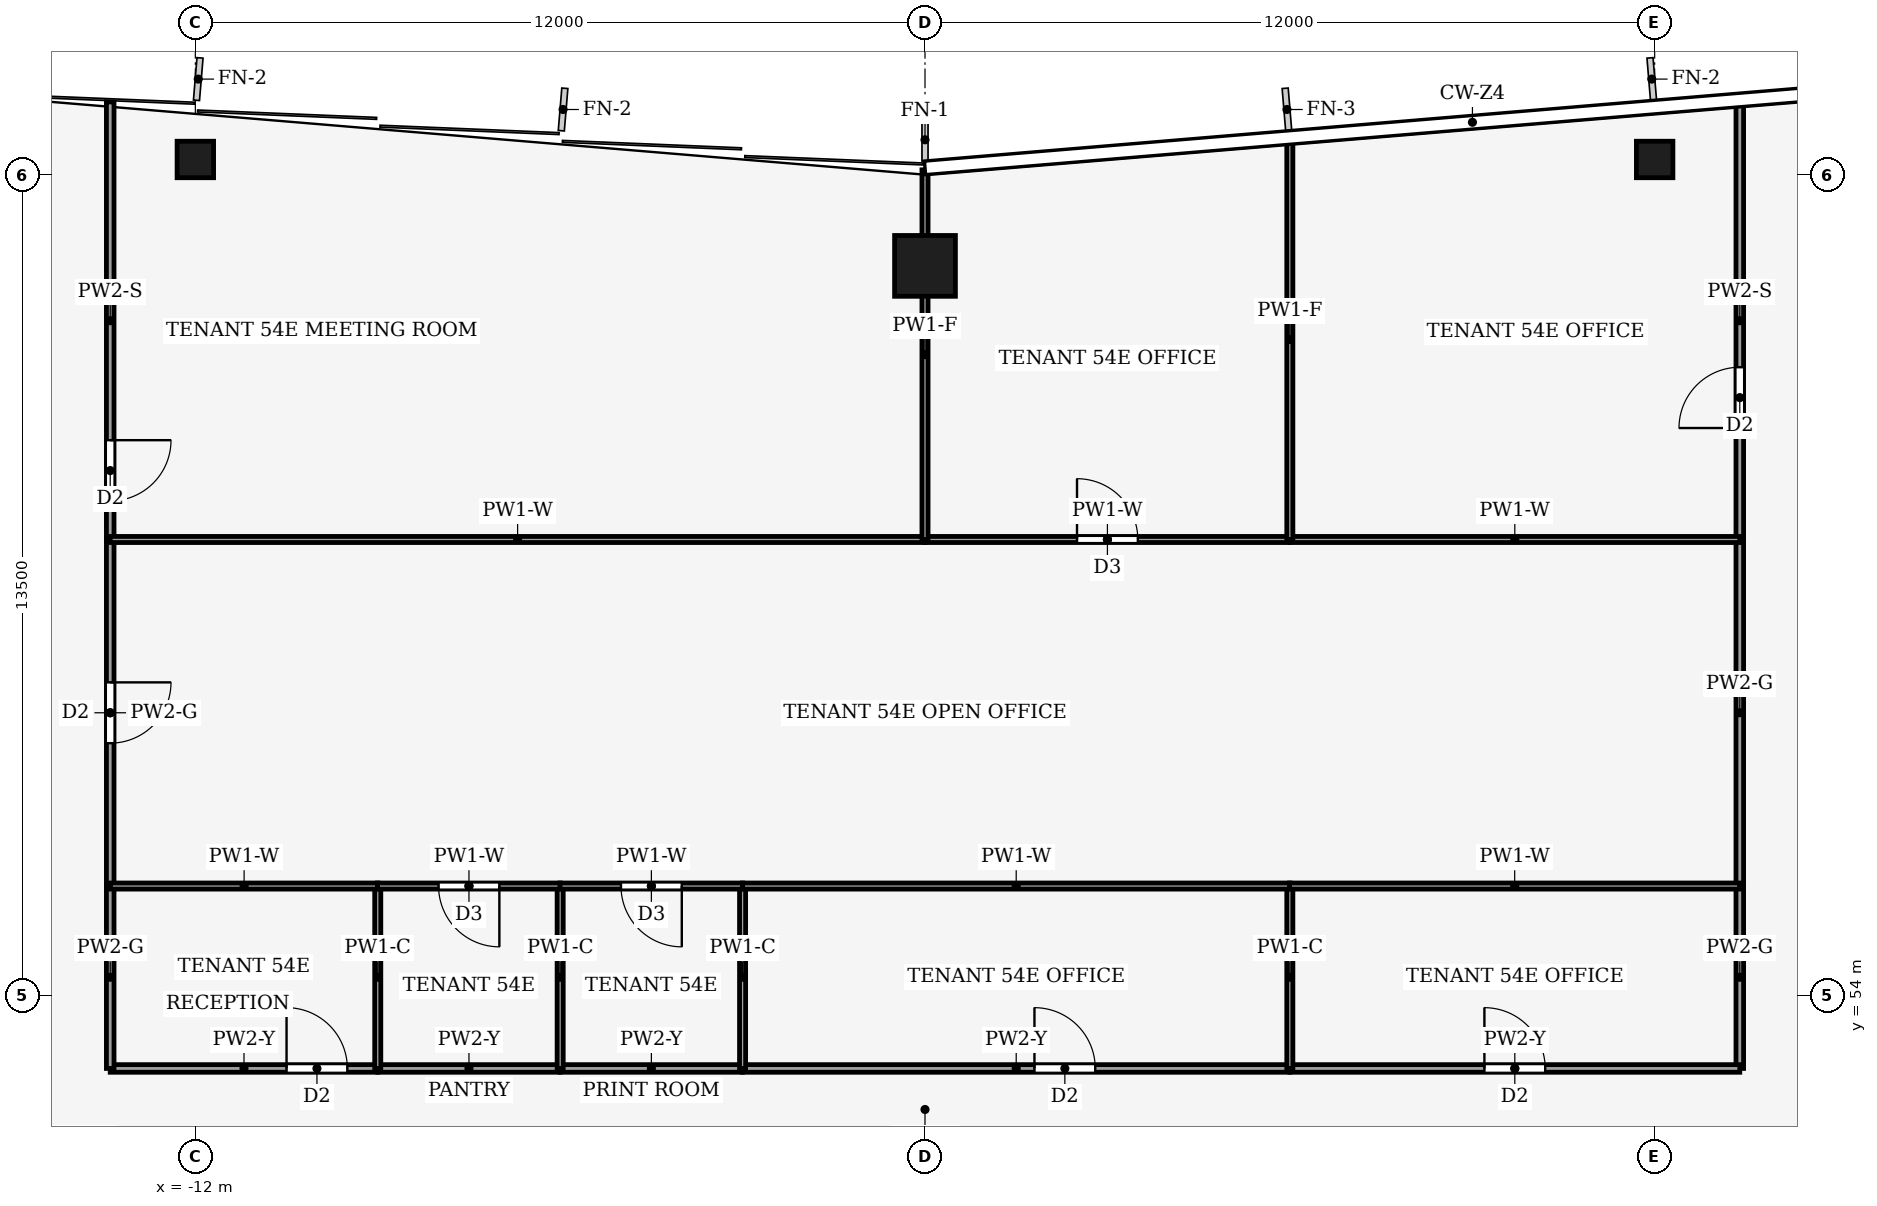
"""IFC4 building model, lengths in metres.
Left out: names, types, materials, properties, quantities, classifications, styles, units other than length and angle.
Written with IfcOpenShell. Run it as: python <this file> out.ifc"""

import sys

from ifc_helpers import new_model, si_unit, direction, frame, frame_2d, origin, origin_2d, place, context, subcontext, project, spatial, rectangle, hollow_rectangle, extrude, element, fill, save


model = new_model("IFC4")
c1 = context("Model", 3, precision=1e-05, world=origin(), true_north=direction((0.0, 1.0)))
c2 = subcontext(c1, "Body", "Model", "MODEL_VIEW")
j1 = project(units=[si_unit("LENGTHUNIT", "METRE"), si_unit("PLANEANGLEUNIT", "RADIAN")], contexts=[c1])
p1 = place(None, origin())
s1 = spatial("IfcSite", under=j1, at=p1, CompositionType="ELEMENT")
p2 = place(p1, origin())
s2 = spatial("IfcBuilding", under=s1, at=p2, CompositionType="ELEMENT")
p3 = place(p2, frame((0.0, 0.0, 238.0)))
s3 = spatial("IfcBuildingStorey", under=s2, at=p3, CompositionType="ELEMENT", Elevation=238.0)
p4 = place(p3, frame((0.0, 66.0, 0.0), z_axis=(0.0, 0.0, 1.0), x_axis=(1.0, 0.0, 0.0)))
e1 = element("IfcColumn", 1, at=p4, inside=s3, PredefinedType="COLUMN", context=c2, shape_type="SweptSolid", body=[
    extrude(hollow_rectangle(XDim=1.0, YDim=1.0, WallThickness=0.045, at=origin_2d()), origin(), (0.0, 0.0, 1.0), 4.0),
])
for number, where, z_axis, x_axis in (
    (2, (-12.0, 67.75, 0.0), (0.0, 0.0, 1.0), (1.0, 0.0, 0.0)),
    (3, (12.0, 67.75, 0.0), (0.0, 0.0, 1.0), (1.0, 0.0, 0.0)),
):
    element("IfcColumn", number, at=place(p3, frame(where, z_axis=z_axis, x_axis=x_axis)), inside=s3, PredefinedType="COLUMN", context=c2, shape_type="SweptSolid", body=[
        extrude(hollow_rectangle(XDim=0.6, YDim=0.6, WallThickness=0.025, at=origin_2d()), origin(), (0.0, 0.0, 1.0), 4.0),
    ])
p5 = place(p3, frame((-13.4, 52.8, 0.0), z_axis=(0.0, 0.0, 1.0), x_axis=(1.0, 0.0, 0.0)))
e4 = element("IfcWall", 4, at=p5, inside=s3, PredefinedType="PARTITIONING", context=c2, shape_type="SweptSolid", body=[
    extrude(rectangle(XDim=4.4, YDim=0.125, at=frame_2d((2.2, 0.0))), origin(), (0.0, 0.0, 1.0), 3.24),
])
p6 = place(p5, frame((2.9, 0.0, 0.0)))
e5 = element("IfcOpeningElement", 5, at=p6, cuts=e4, PredefinedType="OPENING", context=c2, shape_type="SweptSolid", body=[
    extrude(rectangle(XDim=1.0, YDim=2.1, at=frame_2d((0.5, 1.05))), frame((0.0, 0.073, 0.0), z_axis=(0.0, -1.0, 0.0), x_axis=(1.0, 0.0, 0.0)), (0.0, 0.0, 1.0), 0.145),
])
p7 = place(p3, frame((-13.4, 52.8, 0.0), z_axis=(0.0, 0.0, 1.0), x_axis=(0.0, 1.0, 0.0)))
e6 = element("IfcWall", 6, at=p7, inside=s3, PredefinedType="PARTITIONING", context=c2, shape_type="SweptSolid", body=[
    extrude(rectangle(XDim=3.0, YDim=0.125, at=frame_2d((1.5, 0.0))), origin(), (0.0, 0.0, 1.0), 3.87),
])
for number, where, z_axis, x_axis in (
    (7, (-6.0, 52.8, 0.0), (0.0, 0.0, 1.0), (-1.0, 0.0, 0.0)),
    (8, (-3.0, 52.8, 0.0), (0.0, 0.0, 1.0), (-1.0, 0.0, 0.0)),
):
    element("IfcWall", number, at=place(p3, frame(where, z_axis=z_axis, x_axis=x_axis)), inside=s3, PredefinedType="PARTITIONING", context=c2, shape_type="SweptSolid", body=[
        extrude(rectangle(XDim=3.0, YDim=0.125, at=frame_2d((1.5, 0.0))), origin(), (0.0, 0.0, 1.0), 3.24),
    ])
p8 = place(p3, frame((-3.0, 52.8, 0.0), z_axis=(0.0, 0.0, 1.0), x_axis=(1.0, 0.0, 0.0)))
e9 = element("IfcWall", 9, at=p8, inside=s3, PredefinedType="PARTITIONING", context=c2, shape_type="SweptSolid", body=[
    extrude(rectangle(XDim=9.0, YDim=0.125, at=frame_2d((4.5, 0.0))), origin(), (0.0, 0.0, 1.0), 3.24),
])
p9 = place(p8, frame((4.8, 0.0, 0.0)))
e10 = element("IfcOpeningElement", 10, at=p9, cuts=e9, PredefinedType="OPENING", context=c2, shape_type="SweptSolid", body=[
    extrude(rectangle(XDim=1.0, YDim=2.1, at=frame_2d((0.5, 1.05))), frame((0.0, 0.073, 0.0), z_axis=(0.0, -1.0, 0.0), x_axis=(1.0, 0.0, 0.0)), (0.0, 0.0, 1.0), 0.145),
])
p10 = place(p3, frame((13.4, 52.8, 0.0), z_axis=(0.0, 0.0, 1.0), x_axis=(0.0, 1.0, 0.0)))
e11 = element("IfcWall", 11, at=p10, inside=s3, PredefinedType="PARTITIONING", context=c2, shape_type="SweptSolid", body=[
    extrude(rectangle(XDim=3.0, YDim=0.125, at=frame_2d((1.5, 0.0))), origin(), (0.0, 0.0, 1.0), 3.87),
])
p11 = place(p3, frame((6.0, 52.8, 0.0), z_axis=(0.0, 0.0, 1.0), x_axis=(1.0, 0.0, 0.0)))
e12 = element("IfcWall", 12, at=p11, inside=s3, PredefinedType="PARTITIONING", context=c2, shape_type="SweptSolid", body=[
    extrude(rectangle(XDim=7.4, YDim=0.125, at=frame_2d((3.7, 0.0))), origin(), (0.0, 0.0, 1.0), 3.24),
])
p12 = place(p11, frame((3.2, 0.0, 0.0)))
e13 = element("IfcOpeningElement", 13, at=p12, cuts=e12, PredefinedType="OPENING", context=c2, shape_type="SweptSolid", body=[
    extrude(rectangle(XDim=1.0, YDim=2.1, at=frame_2d((0.5, 1.05))), frame((0.0, 0.073, 0.0), z_axis=(0.0, -1.0, 0.0), x_axis=(1.0, 0.0, 0.0)), (0.0, 0.0, 1.0), 0.145),
])
p13 = place(p3, frame((-13.4, 61.5, 0.0), z_axis=(0.0, 0.0, 1.0), x_axis=(0.0, -1.0, 0.0)))
e14 = element("IfcWall", 14, at=p13, inside=s3, PredefinedType="PARTITIONING", context=c2, shape_type="SweptSolid", body=[
    extrude(rectangle(XDim=5.7, YDim=0.125, at=frame_2d((2.85, 0.0))), origin(), (0.0, 0.0, 1.0), 3.87),
])
p14 = place(p13, frame((2.35, 0.0, 0.0)))
e15 = element("IfcOpeningElement", 15, at=p14, cuts=e14, PredefinedType="OPENING", context=c2, shape_type="SweptSolid", body=[
    extrude(rectangle(XDim=1.0, YDim=2.1, at=frame_2d((0.5, 1.05))), frame((0.0, 0.073, 0.0), z_axis=(0.0, -1.0, 0.0), x_axis=(1.0, 0.0, 0.0)), (0.0, 0.0, 1.0), 0.145),
])
p15 = place(p3, frame((13.4, 55.8, 0.0), z_axis=(0.0, 0.0, 1.0), x_axis=(0.0, 1.0, 0.0)))
e16 = element("IfcWall", 16, at=p15, inside=s3, PredefinedType="PARTITIONING", context=c2, shape_type="SweptSolid", body=[
    extrude(rectangle(XDim=5.7, YDim=0.125, at=frame_2d((2.85, 0.0))), origin(), (0.0, 0.0, 1.0), 3.87),
])
p16 = place(p3, frame((-13.4, 68.697, 0.0), z_axis=(0.0, 0.0, 1.0), x_axis=(0.0, -1.0, 0.0)))
e17 = element("IfcWall", 17, at=p16, inside=s3, PredefinedType="PARTITIONING", context=c2, shape_type="SweptSolid", body=[
    extrude(rectangle(XDim=7.197, YDim=0.125, at=frame_2d((3.598, 0.0))), origin(), (0.0, 0.0, 1.0), 3.04),
])
p17 = place(p16, frame((5.563, 0.0, 0.0)))
e18 = element("IfcOpeningElement", 18, at=p17, cuts=e17, PredefinedType="OPENING", context=c2, shape_type="SweptSolid", body=[
    extrude(rectangle(XDim=1.0, YDim=2.1, at=frame_2d((0.5, 1.05))), frame((0.0, 0.073, 0.0), z_axis=(0.0, -1.0, 0.0), x_axis=(1.0, 0.0, 0.0)), (0.0, 0.0, 1.0), 0.145),
])
p18 = place(p3, frame((13.4, 61.5, 0.0), z_axis=(0.0, 0.0, 1.0), x_axis=(0.0, 1.0, 0.0)))
e19 = element("IfcWall", 19, at=p18, inside=s3, PredefinedType="PARTITIONING", context=c2, shape_type="SweptSolid", body=[
    extrude(rectangle(XDim=7.197, YDim=0.125, at=frame_2d((3.598, 0.0))), origin(), (0.0, 0.0, 1.0), 3.04),
])
p19 = place(p18, frame((1.833, 0.0, 0.0)))
e20 = element("IfcOpeningElement", 20, at=p19, cuts=e19, PredefinedType="OPENING", context=c2, shape_type="SweptSolid", body=[
    extrude(rectangle(XDim=1.0, YDim=2.1, at=frame_2d((0.5, 1.05))), frame((0.0, 0.073, 0.0), z_axis=(0.0, -1.0, 0.0), x_axis=(1.0, 0.0, 0.0)), (0.0, 0.0, 1.0), 0.145),
])
p20 = place(p3, frame((-9.0, 52.8, 0.0), z_axis=(0.0, 0.0, 1.0), x_axis=(0.0, 1.0, 0.0)))
e21 = element("IfcWall", 21, at=p20, inside=s3, PredefinedType="PARTITIONING", context=c2, shape_type="SweptSolid", body=[
    extrude(rectangle(XDim=3.0, YDim=0.1, at=frame_2d((1.5, 0.0))), origin(), (0.0, 0.0, 1.0), 3.87),
])
p21 = place(p3, frame((-8.996, 55.8, 0.0), z_axis=(0.0, 0.0, 1.0), x_axis=(-1.0, 0.0, 0.0)))
e22 = element("IfcWall", 22, at=p21, inside=s3, PredefinedType="PARTITIONING", context=c2, shape_type="SweptSolid", body=[
    extrude(rectangle(XDim=4.404, YDim=0.1, at=frame_2d((2.202, 0.0))), origin(), (0.0, 0.0, 1.0), 3.24),
])
p22 = place(p3, frame((-6.0, 52.8, 0.0), z_axis=(0.0, 0.0, 1.0), x_axis=(0.0, 1.0, 0.0)))
e23 = element("IfcWall", 23, at=p22, inside=s3, PredefinedType="PARTITIONING", context=c2, shape_type="SweptSolid", body=[
    extrude(rectangle(XDim=3.0, YDim=0.1, at=frame_2d((1.5, 0.0))), origin(), (0.0, 0.0, 1.0), 3.87),
])
p23 = place(p3, frame((-5.996, 55.8, 0.0), z_axis=(0.0, 0.0, 1.0), x_axis=(-1.0, 0.0, 0.0)))
e24 = element("IfcWall", 24, at=p23, inside=s3, PredefinedType="PARTITIONING", context=c2, shape_type="SweptSolid", body=[
    extrude(rectangle(XDim=3.008, YDim=0.1, at=frame_2d((1.504, 0.0))), origin(), (0.0, 0.0, 1.0), 3.24),
])
p24 = place(p23, frame((1.004, 0.0, 0.0)))
e25 = element("IfcOpeningElement", 25, at=p24, cuts=e24, PredefinedType="OPENING", context=c2, shape_type="SweptSolid", body=[
    extrude(rectangle(XDim=1.0, YDim=2.1, at=frame_2d((0.5, 1.05))), frame((0.0, 0.06, 0.0), z_axis=(0.0, -1.0, 0.0), x_axis=(1.0, 0.0, 0.0)), (0.0, 0.0, 1.0), 0.12),
])
p25 = place(p3, frame((-3.0, 52.8, 0.0), z_axis=(0.0, 0.0, 1.0), x_axis=(0.0, 1.0, 0.0)))
e26 = element("IfcWall", 26, at=p25, inside=s3, PredefinedType="PARTITIONING", context=c2, shape_type="SweptSolid", body=[
    extrude(rectangle(XDim=3.0, YDim=0.1, at=frame_2d((1.5, 0.0))), origin(), (0.0, 0.0, 1.0), 3.87),
])
p26 = place(p3, frame((-2.996, 55.8, 0.0), z_axis=(0.0, 0.0, 1.0), x_axis=(-1.0, 0.0, 0.0)))
e27 = element("IfcWall", 27, at=p26, inside=s3, PredefinedType="PARTITIONING", context=c2, shape_type="SweptSolid", body=[
    extrude(rectangle(XDim=3.008, YDim=0.1, at=frame_2d((1.504, 0.0))), origin(), (0.0, 0.0, 1.0), 3.24),
])
p27 = place(p26, frame((1.004, 0.0, 0.0)))
e28 = element("IfcOpeningElement", 28, at=p27, cuts=e27, PredefinedType="OPENING", context=c2, shape_type="SweptSolid", body=[
    extrude(rectangle(XDim=1.0, YDim=2.1, at=frame_2d((0.5, 1.05))), frame((0.0, 0.06, 0.0), z_axis=(0.0, -1.0, 0.0), x_axis=(1.0, 0.0, 0.0)), (0.0, 0.0, 1.0), 0.12),
])
p28 = place(p3, frame((6.0, 52.8, 0.0), z_axis=(0.0, 0.0, 1.0), x_axis=(0.0, 1.0, 0.0)))
e29 = element("IfcWall", 29, at=p28, inside=s3, PredefinedType="PARTITIONING", context=c2, shape_type="SweptSolid", body=[
    extrude(rectangle(XDim=3.0, YDim=0.1, at=frame_2d((1.5, 0.0))), origin(), (0.0, 0.0, 1.0), 3.87),
])
p29 = place(p3, frame((6.004, 55.8, 0.0), z_axis=(0.0, 0.0, 1.0), x_axis=(-1.0, 0.0, 0.0)))
e30 = element("IfcWall", 30, at=p29, inside=s3, PredefinedType="PARTITIONING", context=c2, shape_type="SweptSolid", body=[
    extrude(rectangle(XDim=9.008, YDim=0.1, at=frame_2d((4.504, 0.0))), origin(), (0.0, 0.0, 1.0), 3.24),
])
p30 = place(p3, frame((13.4, 55.8, 0.0), z_axis=(0.0, 0.0, 1.0), x_axis=(-1.0, 0.0, 0.0)))
e31 = element("IfcWall", 31, at=p30, inside=s3, PredefinedType="PARTITIONING", context=c2, shape_type="SweptSolid", body=[
    extrude(rectangle(XDim=7.404, YDim=0.1, at=frame_2d((3.702, 0.0))), origin(), (0.0, 0.0, 1.0), 3.24),
])
p31 = place(p3, frame((0.0, 61.5, 0.0), z_axis=(0.0, 0.0, 1.0), x_axis=(-1.0, 0.0, 0.0)))
e32 = element("IfcWall", 32, at=p31, inside=s3, PredefinedType="PARTITIONING", context=c2, shape_type="SweptSolid", body=[
    extrude(rectangle(XDim=13.4, YDim=0.1, at=frame_2d((6.7, 0.0))), origin(), (0.0, 0.0, 1.0), 3.24),
])
p32 = place(p3, frame((0.0, 61.5, 0.0), z_axis=(0.0, 0.0, 1.0), x_axis=(1.0, 0.0, 0.0)))
e33 = element("IfcWall", 33, at=p32, inside=s3, PredefinedType="PARTITIONING", context=c2, shape_type="SweptSolid", body=[
    extrude(rectangle(XDim=6.0, YDim=0.1, at=frame_2d((3.0, 0.0))), origin(), (0.0, 0.0, 1.0), 3.24),
])
p33 = place(p32, frame((2.5, 0.0, 0.0)))
e34 = element("IfcOpeningElement", 34, at=p33, cuts=e33, PredefinedType="OPENING", context=c2, shape_type="SweptSolid", body=[
    extrude(rectangle(XDim=1.0, YDim=2.1, at=frame_2d((0.5, 1.05))), frame((0.0, 0.06, 0.0), z_axis=(0.0, -1.0, 0.0), x_axis=(1.0, 0.0, 0.0)), (0.0, 0.0, 1.0), 0.12),
])
p34 = place(p3, frame((13.4, 61.5, 0.0), z_axis=(0.0, 0.0, 1.0), x_axis=(-1.0, 0.0, 0.0)))
e35 = element("IfcWall", 35, at=p34, inside=s3, PredefinedType="PARTITIONING", context=c2, shape_type="SweptSolid", body=[
    extrude(rectangle(XDim=7.4, YDim=0.1, at=frame_2d((3.7, 0.0))), origin(), (0.0, 0.0, 1.0), 3.24),
])
p35 = place(p3, frame((0.0, 61.5, 0.0), z_axis=(0.0, 0.0, 1.0), x_axis=(0.0, 1.0, 0.0)))
e36 = element("IfcWall", 36, at=p35, inside=s3, PredefinedType="PARTITIONING", context=c2, shape_type="SweptSolid", body=[
    extrude(rectangle(XDim=6.08, YDim=0.1, at=frame_2d((3.04, 0.0))), origin(), (0.0, 0.0, 1.0), 3.04),
])
p36 = place(p3, frame((6.0, 61.5, 0.0), z_axis=(0.0, 0.0, 1.0), x_axis=(0.0, 1.0, 0.0)))
e37 = element("IfcWall", 37, at=p36, inside=s3, PredefinedType="PARTITIONING", context=c2, shape_type="SweptSolid", body=[
    extrude(rectangle(XDim=6.58, YDim=0.1, at=frame_2d((3.29, 0.0))), origin(), (0.0, 0.0, 1.0), 3.04),
])
p37 = place(p6, origin())
e38 = element("IfcDoor", 38, at=p37, inside=s3, OperationType="SINGLE_SWING_RIGHT", PredefinedType="DOOR", context=c2, shape_type="SweptSolid", body=[
    extrude(rectangle(XDim=1.0, YDim=2.1, at=frame_2d((0.5, 1.05))), frame((0.0, 0.025, 0.0), z_axis=(0.0, -1.0, 0.0), x_axis=(1.0, 0.0, 0.0)), (0.0, 0.0, 1.0), 0.05),
])
fill(e5, e38)
p38 = place(p9, origin())
e39 = element("IfcDoor", 39, at=p38, inside=s3, OperationType="SINGLE_SWING_RIGHT", PredefinedType="DOOR", context=c2, shape_type="SweptSolid", body=[
    extrude(rectangle(XDim=1.0, YDim=2.1, at=frame_2d((0.5, 1.05))), frame((0.0, 0.025, 0.0), z_axis=(0.0, -1.0, 0.0), x_axis=(1.0, 0.0, 0.0)), (0.0, 0.0, 1.0), 0.05),
])
fill(e10, e39)
p39 = place(p12, origin())
e40 = element("IfcDoor", 40, at=p39, inside=s3, OperationType="SINGLE_SWING_LEFT", PredefinedType="DOOR", context=c2, shape_type="SweptSolid", body=[
    extrude(rectangle(XDim=1.0, YDim=2.1, at=frame_2d((0.5, 1.05))), frame((0.0, 0.025, 0.0), z_axis=(0.0, -1.0, 0.0), x_axis=(1.0, 0.0, 0.0)), (0.0, 0.0, 1.0), 0.05),
])
fill(e13, e40)
p40 = place(p14, origin())
e41 = element("IfcDoor", 41, at=p40, inside=s3, OperationType="SINGLE_SWING_RIGHT", PredefinedType="DOOR", context=c2, shape_type="SweptSolid", body=[
    extrude(rectangle(XDim=1.0, YDim=2.1, at=frame_2d((0.5, 1.05))), frame((0.0, 0.025, 0.0), z_axis=(0.0, -1.0, 0.0), x_axis=(1.0, 0.0, 0.0)), (0.0, 0.0, 1.0), 0.05),
])
fill(e15, e41)
p41 = place(p17, origin())
e42 = element("IfcDoor", 42, at=p41, inside=s3, OperationType="SINGLE_SWING_RIGHT", PredefinedType="DOOR", context=c2, shape_type="SweptSolid", body=[
    extrude(rectangle(XDim=1.0, YDim=2.1, at=frame_2d((0.5, 1.05))), frame((0.0, 0.025, 0.0), z_axis=(0.0, -1.0, 0.0), x_axis=(1.0, 0.0, 0.0)), (0.0, 0.0, 1.0), 0.05),
])
fill(e18, e42)
p42 = place(p19, origin())
e43 = element("IfcDoor", 43, at=p42, inside=s3, OperationType="SINGLE_SWING_LEFT", PredefinedType="DOOR", context=c2, shape_type="SweptSolid", body=[
    extrude(rectangle(XDim=1.0, YDim=2.1, at=frame_2d((0.5, 1.05))), frame((0.0, 0.025, 0.0), z_axis=(0.0, -1.0, 0.0), x_axis=(1.0, 0.0, 0.0)), (0.0, 0.0, 1.0), 0.05),
])
fill(e20, e43)
p43 = place(p24, origin())
e44 = element("IfcDoor", 44, at=p43, inside=s3, OperationType="SINGLE_SWING_RIGHT", PredefinedType="DOOR", context=c2, shape_type="SweptSolid", body=[
    extrude(rectangle(XDim=1.0, YDim=2.1, at=frame_2d((0.5, 1.05))), frame((0.0, 0.025, 0.0), z_axis=(0.0, -1.0, 0.0), x_axis=(1.0, 0.0, 0.0)), (0.0, 0.0, 1.0), 0.05),
])
fill(e25, e44)
p44 = place(p27, origin())
e45 = element("IfcDoor", 45, at=p44, inside=s3, OperationType="SINGLE_SWING_LEFT", PredefinedType="DOOR", context=c2, shape_type="SweptSolid", body=[
    extrude(rectangle(XDim=1.0, YDim=2.1, at=frame_2d((0.5, 1.05))), frame((0.0, 0.025, 0.0), z_axis=(0.0, -1.0, 0.0), x_axis=(1.0, 0.0, 0.0)), (0.0, 0.0, 1.0), 0.05),
])
fill(e28, e45)
p45 = place(p33, origin())
e46 = element("IfcDoor", 46, at=p45, inside=s3, OperationType="SINGLE_SWING_RIGHT", PredefinedType="DOOR", context=c2, shape_type="SweptSolid", body=[
    extrude(rectangle(XDim=1.0, YDim=2.1, at=frame_2d((0.5, 1.05))), frame((0.0, 0.025, 0.0), z_axis=(0.0, -1.0, 0.0), x_axis=(1.0, 0.0, 0.0)), (0.0, 0.0, 1.0), 0.05),
])
fill(e34, e46)
save(model, sys.argv[1])
